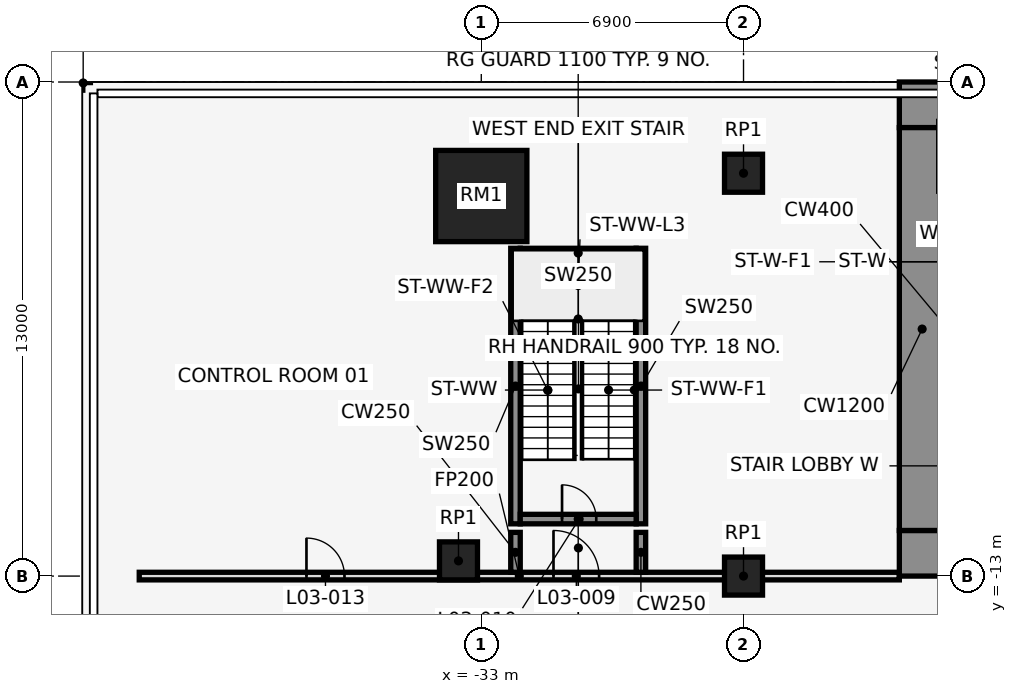
"""IFC4 building model, lengths in metres.
Left out: names, types, materials, properties, quantities, classifications, styles, units other than length and angle.
Written with IfcOpenShell. Run it as: python <this file> out.ifc"""

import sys

from ifc_helpers import new_model, si_unit, direction, frame, frame_2d, origin, origin_2d, place, context, subcontext, project, spatial, rectangle, extrude, element, fill, save


model = new_model("IFC4")
c1 = context("Model", 3, precision=1e-05, world=origin(), true_north=direction((0.0, 1.0)))
c2 = subcontext(c1, "Body", "Model", "MODEL_VIEW")
j1 = project(units=[si_unit("LENGTHUNIT", "METRE"), si_unit("PLANEANGLEUNIT", "RADIAN")], contexts=[c1])
p1 = place(None, origin())
s1 = spatial("IfcSite", under=j1, at=p1, CompositionType="ELEMENT")
p2 = place(p1, origin())
s2 = spatial("IfcBuilding", under=s1, at=p2, CompositionType="ELEMENT")
p3 = place(p2, frame((0.0, 0.0, 20.0)))
s3 = spatial("IfcBuildingStorey", under=s2, at=p3, CompositionType="ELEMENT", Elevation=20.0)
p4 = place(p3, frame((-33.0, -3.0, 0.0), z_axis=(0.0, 0.0, 1.0), x_axis=(1.0, 0.0, 0.0)))
e1 = element("IfcColumn", 1, at=p4, inside=s3, PredefinedType="COLUMN", context=c2, shape_type="SweptSolid", body=[
    extrude(rectangle(XDim=2.4, YDim=2.4, at=origin_2d()), origin(), (0.0, 0.0, 1.0), 5.0),
])
for number, where, z_axis, x_axis in (
    (2, (-26.1, -2.4, 0.0), (0.0, 0.0, 1.0), (1.0, 0.0, 0.0)),
    (3, (-33.6, -12.6, 0.0), (0.0, 0.0, 1.0), (1.0, 0.0, 0.0)),
    (4, (-26.1, -13.0, 0.0), (0.0, 0.0, 1.0), (1.0, 0.0, 0.0)),
):
    element("IfcColumn", number, at=place(p3, frame(where, z_axis=z_axis, x_axis=x_axis)), inside=s3, PredefinedType="COLUMN", context=c2, shape_type="SweptSolid", body=[
        extrude(rectangle(XDim=1.0, YDim=1.0, at=origin_2d()), origin(), (0.0, 0.0, 1.0), 5.0),
    ])
for number, where, z_axis, x_axis in (
    (5, (-32.1, -11.625, 0.0), (0.0, 0.0, 1.0), (0.0, 1.0, 0.0)),
    (6, (-28.8, -11.625, 0.0), (0.0, 0.0, 1.0), (0.0, 1.0, 0.0)),
):
    element("IfcWall", number, at=place(p3, frame(where, z_axis=z_axis, x_axis=x_axis)), inside=s3, PredefinedType="SHEAR", context=c2, shape_type="SweptSolid", body=[
        extrude(rectangle(XDim=7.25, YDim=0.25, at=frame_2d((3.625, 0.0))), origin(), (0.0, 0.0, 1.0), 5.0),
    ])
p5 = place(p3, frame((-31.975, -11.5, 0.0), z_axis=(0.0, 0.0, 1.0), x_axis=(1.0, 0.0, 0.0)))
e7 = element("IfcWall", 7, at=p5, inside=s3, PredefinedType="SHEAR", context=c2, shape_type="SweptSolid", body=[
    extrude(rectangle(XDim=3.05, YDim=0.25, at=frame_2d((1.525, 0.0))), origin(), (0.0, 0.0, 1.0), 5.0),
])
p6 = place(p5, frame((1.1, 0.0, 0.0)))
e8 = element("IfcOpeningElement", 8, at=p6, cuts=e7, PredefinedType="OPENING", context=c2, shape_type="SweptSolid", body=[
    extrude(rectangle(XDim=0.9, YDim=2.1, at=frame_2d((0.45, 1.05))), frame((0.0, 0.137, 0.0), z_axis=(0.0, -1.0, 0.0), x_axis=(1.0, 0.0, 0.0)), (0.0, 0.0, 1.0), 0.274),
])
p7 = place(p3, frame((-31.975, -4.5, 0.0), z_axis=(0.0, 0.0, 1.0), x_axis=(1.0, 0.0, 0.0)))
e9 = element("IfcWall", 9, at=p7, inside=s3, PredefinedType="SHEAR", context=c2, shape_type="SweptSolid", body=[
    extrude(rectangle(XDim=3.05, YDim=0.25, at=frame_2d((1.525, 0.0))), origin(), (0.0, 0.0, 1.0), 5.0),
])
p8 = place(p3, frame((-42.0, -13.0, 0.0), z_axis=(0.0, 0.0, 1.0), x_axis=(1.0, 0.0, 0.0)))
e10 = element("IfcWall", 10, at=p8, inside=s3, PredefinedType="PARTITIONING", context=c2, shape_type="SweptSolid", body=[
    extrude(rectangle(XDim=20.0, YDim=0.2, at=frame_2d((10.0, 0.0))), origin(), (0.0, 0.0, 1.0), 4.7),
])
p9 = place(p8, frame((10.9, 0.0, 0.0)))
e11 = element("IfcOpeningElement", 11, at=p9, cuts=e10, PredefinedType="OPENING", context=c2, shape_type="SweptSolid", body=[
    extrude(rectangle(XDim=1.2, YDim=2.1, at=frame_2d((0.6, 1.05))), frame((0.0, 0.112, 0.0), z_axis=(0.0, -1.0, 0.0), x_axis=(1.0, 0.0, 0.0)), (0.0, 0.0, 1.0), 0.224),
])
p10 = place(p8, frame((4.4, 0.0, 0.0)))
e12 = element("IfcOpeningElement", 12, at=p10, cuts=e10, PredefinedType="OPENING", context=c2, shape_type="SweptSolid", body=[
    extrude(rectangle(XDim=1.0, YDim=2.1, at=frame_2d((0.5, 1.05))), frame((0.0, 0.112, 0.0), z_axis=(0.0, -1.0, 0.0), x_axis=(1.0, 0.0, 0.0)), (0.0, 0.0, 1.0), 0.224),
])
for number, where, z_axis, x_axis in (
    (13, (-32.1, -12.9, 0.0), (0.0, 0.0, 1.0), (0.0, 1.0, 0.0)),
    (14, (-28.8, -12.9, 0.0), (0.0, 0.0, 1.0), (0.0, 1.0, 0.0)),
):
    element("IfcWall", number, at=place(p3, frame(where, z_axis=z_axis, x_axis=x_axis)), inside=s3, PredefinedType="SHEAR", context=c2, shape_type="SweptSolid", body=[
        extrude(rectangle(XDim=1.05, YDim=0.25, at=frame_2d((0.525, 0.0))), origin(), (0.0, 0.0, 1.0), 5.0),
    ])
p11 = place(p3, frame((-22.0, -0.6, 0.0), z_axis=(0.0, 0.0, 1.0), x_axis=(1.0, 0.0, 0.0)))
e15 = element("IfcWall", 15, at=p11, inside=s3, PredefinedType="SHEAR", context=c2, shape_type="SweptSolid", body=[
    extrude(rectangle(XDim=44.0, YDim=1.2, at=frame_2d((22.0, 0.0))), origin(), (0.0, 0.0, 1.0), 5.0),
])
p12 = place(p3, frame((-22.0, -12.4, 0.0), z_axis=(0.0, 0.0, 1.0), x_axis=(1.0, 0.0, 0.0)))
e16 = element("IfcWall", 16, at=p12, inside=s3, PredefinedType="SHEAR", context=c2, shape_type="SweptSolid", body=[
    extrude(rectangle(XDim=44.0, YDim=1.2, at=frame_2d((22.0, 0.0))), origin(), (0.0, 0.0, 1.0), 5.0),
])
p13 = place(p12, frame((2.2, 0.0, 0.0)))
e17 = element("IfcOpeningElement", 17, at=p13, cuts=e16, PredefinedType="OPENING", context=c2, shape_type="SweptSolid", body=[
    extrude(rectangle(XDim=1.2, YDim=2.1, at=frame_2d((0.6, 1.05))), frame((0.0, 0.612, 0.0), z_axis=(0.0, -1.0, 0.0), x_axis=(1.0, 0.0, 0.0)), (0.0, 0.0, 1.0), 1.224),
])
p14 = place(p12, frame((21.4, 0.0, 0.0)))
e18 = element("IfcOpeningElement", 18, at=p14, cuts=e16, PredefinedType="OPENING", context=c2, shape_type="SweptSolid", body=[
    extrude(rectangle(XDim=1.2, YDim=2.1, at=frame_2d((0.6, 1.05))), frame((0.0, 0.612, 0.0), z_axis=(0.0, -1.0, 0.0), x_axis=(1.0, 0.0, 0.0)), (0.0, 0.0, 1.0), 1.224),
])
p15 = place(p12, frame((40.6, 0.0, 0.0)))
e19 = element("IfcOpeningElement", 19, at=p15, cuts=e16, PredefinedType="OPENING", context=c2, shape_type="SweptSolid", body=[
    extrude(rectangle(XDim=1.2, YDim=2.1, at=frame_2d((0.6, 1.05))), frame((0.0, 0.612, 0.0), z_axis=(0.0, -1.0, 0.0), x_axis=(1.0, 0.0, 0.0)), (0.0, 0.0, 1.0), 1.224),
])
p16 = place(p12, frame((16.0, 0.0, 0.0)))
e20 = element("IfcOpeningElement", 20, at=p16, cuts=e16, PredefinedType="OPENING", context=c2, shape_type="SweptSolid", body=[
    extrude(rectangle(XDim=1.8, YDim=2.1, at=frame_2d((0.9, 1.05))), frame((0.0, 0.612, 0.0), z_axis=(0.0, -1.0, 0.0), x_axis=(1.0, 0.0, 0.0)), (0.0, 0.0, 1.0), 1.224),
])
p17 = place(p12, frame((6.3, 0.0, 0.0)))
e21 = element("IfcOpeningElement", 21, at=p17, cuts=e16, PredefinedType="OPENING", context=c2, shape_type="SweptSolid", body=[
    extrude(rectangle(XDim=1.2, YDim=2.1, at=frame_2d((0.6, 1.05))), frame((0.0, 0.612, 0.0), z_axis=(0.0, -1.0, 0.0), x_axis=(1.0, 0.0, 0.0)), (0.0, 0.0, 1.0), 1.224),
])
p18 = place(p12, frame((26.2, 0.0, 0.0)))
e22 = element("IfcOpeningElement", 22, at=p18, cuts=e16, PredefinedType="OPENING", context=c2, shape_type="SweptSolid", body=[
    extrude(rectangle(XDim=1.8, YDim=2.1, at=frame_2d((0.9, 1.05))), frame((0.0, 0.612, 0.0), z_axis=(0.0, -1.0, 0.0), x_axis=(1.0, 0.0, 0.0)), (0.0, 0.0, 1.0), 1.224),
])
p19 = place(p12, frame((36.5, 0.0, 0.0)))
e23 = element("IfcOpeningElement", 23, at=p19, cuts=e16, PredefinedType="OPENING", context=c2, shape_type="SweptSolid", body=[
    extrude(rectangle(XDim=1.2, YDim=2.1, at=frame_2d((0.6, 1.05))), frame((0.0, 0.612, 0.0), z_axis=(0.0, -1.0, 0.0), x_axis=(1.0, 0.0, 0.0)), (0.0, 0.0, 1.0), 1.224),
])
p20 = place(p3, frame((-21.4, -11.8, 0.0), z_axis=(0.0, 0.0, 1.0), x_axis=(0.0, 1.0, 0.0)))
e24 = element("IfcWall", 24, at=p20, inside=s3, PredefinedType="SHEAR", context=c2, shape_type="SweptSolid", body=[
    extrude(rectangle(XDim=10.6, YDim=1.2, at=frame_2d((5.3, 0.0))), origin(), (0.0, 0.0, 1.0), 5.0),
])
p21 = place(p9, origin())
e25 = element("IfcDoor", 25, at=p21, inside=s3, OperationType="SINGLE_SWING_RIGHT", PredefinedType="DOOR", context=c2, shape_type="SweptSolid", body=[
    extrude(rectangle(XDim=1.2, YDim=2.1, at=frame_2d((0.6, 1.05))), frame((0.0, 0.025, 0.0), z_axis=(0.0, -1.0, 0.0), x_axis=(1.0, 0.0, 0.0)), (0.0, 0.0, 1.0), 0.05),
])
fill(e11, e25)
p22 = place(p6, origin())
e26 = element("IfcDoor", 26, at=p22, inside=s3, OperationType="SINGLE_SWING_LEFT", PredefinedType="DOOR", context=c2, shape_type="SweptSolid", body=[
    extrude(rectangle(XDim=0.9, YDim=2.1, at=frame_2d((0.45, 1.05))), frame((0.0, 0.025, 0.0), z_axis=(0.0, -1.0, 0.0), x_axis=(1.0, 0.0, 0.0)), (0.0, 0.0, 1.0), 0.05),
])
fill(e8, e26)
p23 = place(p10, origin())
e27 = element("IfcDoor", 27, at=p23, inside=s3, OperationType="SINGLE_SWING_LEFT", PredefinedType="DOOR", context=c2, shape_type="SweptSolid", body=[
    extrude(rectangle(XDim=1.0, YDim=2.1, at=frame_2d((0.5, 1.05))), frame((0.0, 0.025, 0.0), z_axis=(0.0, -1.0, 0.0), x_axis=(1.0, 0.0, 0.0)), (0.0, 0.0, 1.0), 0.05),
])
fill(e12, e27)
save(model, sys.argv[1])
